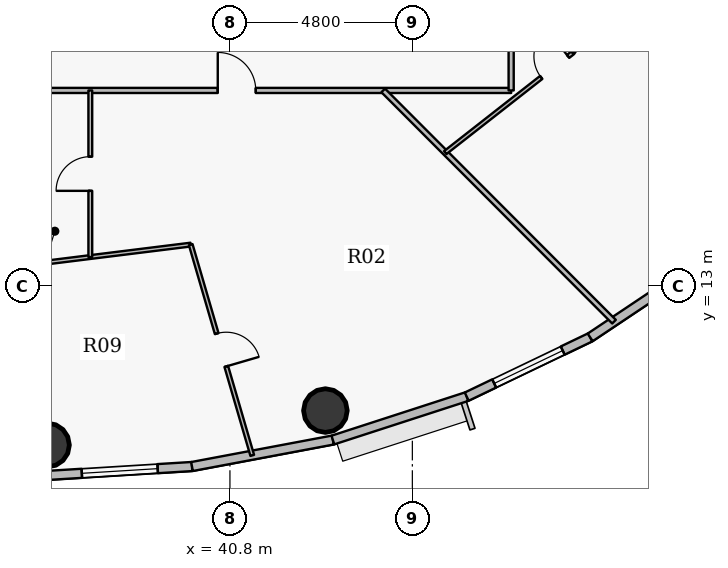
"""IFC4 building model, lengths in metres.
Left out: names, types, materials, properties, quantities, classifications, styles, units other than length and angle.
Written with IfcOpenShell. Run it as: python <this file> out.ifc"""

import sys

from ifc_helpers import new_model, si_unit, direction, frame, frame_2d, origin, origin_2d, place, context, subcontext, project, spatial, rectangle, hollow_circle, extrude, source, transform, mapped, element, fill, save


model = new_model("IFC4")
c1 = context("Model", 3, precision=1e-05, world=origin(), true_north=direction((0.0, 1.0)))
c2 = subcontext(c1, "Body", "Model", "MODEL_VIEW")
j1 = project(units=[si_unit("LENGTHUNIT", "METRE"), si_unit("PLANEANGLEUNIT", "RADIAN")], contexts=[c1])
p1 = place(None, origin())
s1 = spatial("IfcSite", under=j1, at=p1, CompositionType="ELEMENT")
p2 = place(p1, origin())
s2 = spatial("IfcBuilding", under=s1, at=p2, CompositionType="ELEMENT")
p3 = place(p2, frame((0.0, 0.0, 217.8)))
s3 = spatial("IfcBuildingStorey", under=s2, at=p3, CompositionType="ELEMENT", Elevation=217.8)
for number, where, z_axis, x_axis in (
    (1, (36.0, 8.82, 0.0), (0.0, 0.0, 1.0), (1.0, 0.0, 0.0)),
    (2, (43.312, 9.727, 0.0), (0.0, 0.0, 1.0), (1.0, 0.0, 0.0)),
):
    element("IfcColumn", number, at=place(p3, frame(where, z_axis=z_axis, x_axis=x_axis)), inside=s3, PredefinedType="COLUMN", context=c2, shape_type="SweptSolid", body=[
        extrude(hollow_circle(Radius=0.575, WallThickness=0.036, at=origin_2d()), origin(), (0.0, 0.0, 1.0), 3.75),
    ])
p4 = place(p3, frame((39.802, 8.254, 0.0), z_axis=(0.0, 0.0, 1.0), x_axis=(-0.998108785312, -0.06147237333, 0.0)))
e3 = element("IfcWall", 3, at=p4, inside=s3, PredefinedType="SOLIDWALL", context=c2, shape_type="SweptSolid", body=[
    extrude(rectangle(XDim=3.809, YDim=0.24, at=frame_2d((1.904, 0.0))), origin(), (0.0, 0.0, 1.0), 3.5),
])
p5 = place(p4, frame((0.905, 0.0, 0.9)))
e4 = element("IfcOpeningElement", 4, at=p5, cuts=e3, PredefinedType="OPENING", context=c2, shape_type="SweptSolid", body=[
    extrude(rectangle(XDim=2.0, YDim=1.75, at=origin_2d()), frame((1.0, 0.13, 0.875), z_axis=(0.0, -1.0, 0.0), x_axis=(1.0, 0.0, 0.0)), (0.0, 0.0, 1.0), 0.26),
])
p6 = place(p3, frame((43.509, 8.951, 0.0), z_axis=(0.0, 0.0, 1.0), x_axis=(-0.982784898575, -0.184753465822, 0.0)))
e5 = element("IfcWall", 5, at=p6, inside=s3, PredefinedType="SOLIDWALL", context=c2, shape_type="SweptSolid", body=[
    extrude(rectangle(XDim=3.773, YDim=0.24, at=frame_2d((1.886, 0.0))), origin(), (0.0, 0.0, 1.0), 3.5),
])
p7 = place(p3, frame((47.031, 10.094, 0.0), z_axis=(0.0, 0.0, 1.0), x_axis=(-0.951210789182, -0.308541787354, 0.0)))
e6 = element("IfcWall", 6, at=p7, inside=s3, PredefinedType="SOLIDWALL", context=c2, shape_type="SweptSolid", body=[
    extrude(rectangle(XDim=3.702, YDim=0.24, at=frame_2d((1.851, 0.0))), origin(), (0.0, 0.0, 1.0), 3.5),
])
p8 = place(p3, frame((50.28, 11.652, 0.0), z_axis=(0.0, 0.0, 1.0), x_axis=(-0.901598104751, -0.432574684313, 0.0)))
e7 = element("IfcWall", 7, at=p8, inside=s3, PredefinedType="SOLIDWALL", context=c2, shape_type="SweptSolid", body=[
    extrude(rectangle(XDim=3.604, YDim=0.24, at=frame_2d((1.802, 0.0))), origin(), (0.0, 0.0, 1.0), 3.5),
])
p9 = place(p8, frame((0.802, 0.0, 0.9)))
e8 = element("IfcOpeningElement", 8, at=p9, cuts=e7, PredefinedType="OPENING", context=c2, shape_type="SweptSolid", body=[
    extrude(rectangle(XDim=2.0, YDim=1.75, at=origin_2d()), frame((1.0, 0.13, 0.875), z_axis=(0.0, -1.0, 0.0), x_axis=(1.0, 0.0, 0.0)), (0.0, 0.0, 1.0), 0.26),
])
p10 = place(p3, frame((53.176, 13.589, 0.0), z_axis=(0.0, 0.0, 1.0), x_axis=(-0.831262496074, -0.555880079352, 0.0)))
e9 = element("IfcWall", 9, at=p10, inside=s3, PredefinedType="SOLIDWALL", context=c2, shape_type="SweptSolid", body=[
    extrude(rectangle(XDim=3.484, YDim=0.24, at=frame_2d((1.742, 0.0))), origin(), (0.0, 0.0, 1.0), 3.5),
])
p11 = place(p3, frame((24.35, 18.15, 0.0), z_axis=(0.0, 0.0, 1.0), x_axis=(1.0, 0.0, 0.0)))
e10 = element("IfcWall", 10, at=p11, inside=s3, PredefinedType="PARTITIONING", context=c2, shape_type="SweptSolid", body=[
    extrude(rectangle(XDim=23.85, YDim=0.135, at=frame_2d((11.925, 0.0))), origin(), (0.0, 0.0, 1.0), 2.935),
])
p12 = place(p11, frame((2.87, 0.0, 0.0)))
e11 = element("IfcOpeningElement", 11, at=p12, cuts=e10, PredefinedType="OPENING", context=c2, shape_type="SweptSolid", body=[
    extrude(rectangle(XDim=1.0, YDim=2.15, at=origin_2d()), frame((0.5, 0.078, 1.075), z_axis=(0.0, -1.0, 0.0), x_axis=(1.0, 0.0, 0.0)), (0.0, 0.0, 1.0), 0.155),
])
p13 = place(p11, frame((16.13, 0.0, 0.0)))
e12 = element("IfcOpeningElement", 12, at=p13, cuts=e10, PredefinedType="OPENING", context=c2, shape_type="SweptSolid", body=[
    extrude(rectangle(XDim=1.0, YDim=2.15, at=origin_2d()), frame((0.5, 0.078, 1.075), z_axis=(0.0, -1.0, 0.0), x_axis=(1.0, 0.0, 0.0)), (0.0, 0.0, 1.0), 0.155),
])
p14 = place(p3, frame((36.0, 13.626, 0.0), z_axis=(0.0, 0.0, 1.0), x_axis=(0.992397118202, 0.123077048159, 0.0)))
e13 = element("IfcWall", 13, at=p14, inside=s3, PredefinedType="PARTITIONING", context=c2, shape_type="SweptSolid", body=[
    extrude(rectangle(XDim=3.797, YDim=0.1, at=frame_2d((1.898, 0.0))), origin(), (0.0, 0.0, 1.0), 2.935),
])
p15 = place(p3, frame((37.126, 13.766, 0.0), z_axis=(0.0, 0.0, 1.0), x_axis=(0.0, 1.0, 0.0)))
e14 = element("IfcWall", 14, at=p15, inside=s3, PredefinedType="PARTITIONING", context=c2, shape_type="SweptSolid", body=[
    extrude(rectangle(XDim=4.384, YDim=0.1, at=frame_2d((2.192, 0.0))), origin(), (0.0, 0.0, 1.0), 3.035),
])
p16 = place(p15, frame((1.742, 0.0, 0.0)))
e15 = element("IfcOpeningElement", 15, at=p16, cuts=e14, PredefinedType="OPENING", context=c2, shape_type="SweptSolid", body=[
    extrude(rectangle(XDim=0.9, YDim=2.1, at=origin_2d()), frame((0.45, 0.06, 1.05), z_axis=(0.0, -1.0, 0.0), x_axis=(1.0, 0.0, 0.0)), (0.0, 0.0, 1.0), 0.12),
])
p17 = place(p3, frame((39.768, 14.094, 0.0), z_axis=(0.0, 0.0, 1.0), x_axis=(0.280219030024, -0.959936089129, 0.0)))
e16 = element("IfcWall", 16, at=p17, inside=s3, PredefinedType="PARTITIONING", context=c2, shape_type="SweptSolid", body=[
    extrude(rectangle(XDim=5.778, YDim=0.1, at=frame_2d((2.889, 0.0))), origin(), (0.0, 0.0, 1.0), 2.985),
])
p18 = place(p17, frame((2.439, 0.0, 0.0)))
e17 = element("IfcOpeningElement", 17, at=p18, cuts=e16, PredefinedType="OPENING", context=c2, shape_type="SweptSolid", body=[
    extrude(rectangle(XDim=0.9, YDim=2.1, at=origin_2d()), frame((0.45, 0.06, 1.05), z_axis=(0.0, -1.0, 0.0), x_axis=(1.0, 0.0, 0.0)), (0.0, 0.0, 1.0), 0.12),
])
p19 = place(p3, frame((44.833, 18.15, 0.0), z_axis=(0.0, 0.0, 1.0), x_axis=(0.706467502326, -0.707745482612, 0.0)))
e18 = element("IfcWall", 18, at=p19, inside=s3, PredefinedType="PARTITIONING", context=c2, shape_type="SweptSolid", body=[
    extrude(rectangle(XDim=8.597, YDim=0.135, at=frame_2d((4.298, 0.0))), origin(), (0.0, 0.0, 1.0), 2.985),
])
p20 = place(p3, frame((46.466, 16.515, 0.0), z_axis=(0.0, 0.0, 1.0), x_axis=(0.787371868093, 0.616478338092, 0.0)))
e19 = element("IfcWall", 19, at=p20, inside=s3, PredefinedType="PARTITIONING", context=c2, shape_type="SweptSolid", body=[
    extrude(rectangle(XDim=4.257, YDim=0.1, at=frame_2d((2.129, 0.0))), origin(), (0.0, 0.0, 1.0), 2.935),
])
p21 = place(p20, frame((3.206, 0.0, 0.0)))
e20 = element("IfcOpeningElement", 20, at=p21, cuts=e19, PredefinedType="OPENING", context=c2, shape_type="SweptSolid", body=[
    extrude(rectangle(XDim=0.9, YDim=2.1, at=origin_2d()), frame((0.45, 0.06, 1.05), z_axis=(0.0, -1.0, 0.0), x_axis=(1.0, 0.0, 0.0)), (0.0, 0.0, 1.0), 0.12),
])
p22 = place(p3, frame((48.2, 18.15, 0.0), z_axis=(0.0, 0.0, 1.0), x_axis=(0.0, 1.0, 0.0)))
e21 = element("IfcWall", 21, at=p22, inside=s3, PredefinedType="PARTITIONING", context=c2, shape_type="SweptSolid", body=[
    extrude(rectangle(XDim=1.9, YDim=0.135, at=frame_2d((0.95, 0.0))), origin(), (0.0, 0.0, 1.0), 3.5),
])
p23 = place(p3, frame((49.818, 19.139, 0.0), z_axis=(0.0, 0.0, 1.0), x_axis=(0.545406924684, 0.83817139447, 0.0)))
e22 = element("IfcWall", 22, at=p23, inside=s3, PredefinedType="PARTITIONING", context=c2, shape_type="SweptSolid", body=[
    extrude(rectangle(XDim=4.448, YDim=0.1, at=frame_2d((2.224, 0.0))), origin(), (0.0, 0.0, 1.0), 2.935),
])
m1 = source(origin(), c2, "Body", "SweptSolid", [
    extrude(rectangle(XDim=2.0, YDim=1.75, at=origin_2d()), frame((1.0, 0.03, 0.875), z_axis=(0.0, -1.0, 0.0), x_axis=(1.0, 0.0, 0.0)), (0.0, 0.0, 1.0), 0.06),
])
p24 = place(p5, origin())
e23 = element("IfcWindow", 23, at=p24, inside=s3, PartitioningType="DOUBLE_PANEL_VERTICAL", PredefinedType="WINDOW", context=c2, shape_type="MappedRepresentation", body=[
    mapped(m1, transform((0.0, 0.0, 0.0), x_axis=(1.0, 0.0, 0.0), y_axis=(0.0, 1.0, 0.0), z_axis=(0.0, 0.0, 1.0), scale=1.0)),
])
fill(e4, e23)
p25 = place(p9, origin())
e24 = element("IfcWindow", 24, at=p25, inside=s3, PartitioningType="DOUBLE_PANEL_VERTICAL", PredefinedType="WINDOW", context=c2, shape_type="MappedRepresentation", body=[
    mapped(m1, transform((0.0, 0.0, 0.0), x_axis=(1.0, 0.0, 0.0), y_axis=(0.0, 1.0, 0.0), z_axis=(0.0, 0.0, 1.0), scale=1.0)),
])
fill(e8, e24)
m2 = source(origin(), c2, "Body", "SweptSolid", [
    extrude(rectangle(XDim=1.0, YDim=2.15, at=origin_2d()), frame((0.5, 0.025, 1.075), z_axis=(0.0, -1.0, 0.0), x_axis=(1.0, 0.0, 0.0)), (0.0, 0.0, 1.0), 0.05),
])
p26 = place(p13, origin())
e25 = element("IfcDoor", 25, at=p26, inside=s3, OperationType="SINGLE_SWING_LEFT", PredefinedType="DOOR", context=c2, shape_type="MappedRepresentation", body=[
    mapped(m2, transform((0.0, 0.0, 0.0), x_axis=(1.0, 0.0, 0.0), y_axis=(0.0, 1.0, 0.0), z_axis=(0.0, 0.0, 1.0), scale=1.0)),
])
fill(e12, e25)
m3 = source(origin(), c2, "Body", "SweptSolid", [
    extrude(rectangle(XDim=0.9, YDim=2.1, at=origin_2d()), frame((0.45, 0.025, 1.05), z_axis=(0.0, -1.0, 0.0), x_axis=(1.0, 0.0, 0.0)), (0.0, 0.0, 1.0), 0.05),
])
p27 = place(p18, origin())
e26 = element("IfcDoor", 26, at=p27, inside=s3, OperationType="SINGLE_SWING_RIGHT", PredefinedType="DOOR", context=c2, shape_type="MappedRepresentation", body=[
    mapped(m3, transform((0.0, 0.0, 0.0), x_axis=(1.0, 0.0, 0.0), y_axis=(0.0, 1.0, 0.0), z_axis=(0.0, 0.0, 1.0), scale=1.0)),
])
fill(e17, e26)
p28 = place(p16, origin())
e27 = element("IfcDoor", 27, at=p28, inside=s3, OperationType="SINGLE_SWING_LEFT", PredefinedType="DOOR", context=c2, shape_type="MappedRepresentation", body=[
    mapped(m3, transform((0.0, 0.0, 0.0), x_axis=(1.0, 0.0, 0.0), y_axis=(0.0, 1.0, 0.0), z_axis=(0.0, 0.0, 1.0), scale=1.0)),
])
fill(e15, e27)
p29 = place(p21, origin())
e28 = element("IfcDoor", 28, at=p29, inside=s3, OperationType="SINGLE_SWING_RIGHT", PredefinedType="DOOR", context=c2, shape_type="MappedRepresentation", body=[
    mapped(m3, transform((0.0, 0.0, 0.0), x_axis=(1.0, 0.0, 0.0), y_axis=(0.0, 1.0, 0.0), z_axis=(0.0, 0.0, 1.0), scale=1.0)),
])
fill(e20, e28)
save(model, sys.argv[1])
